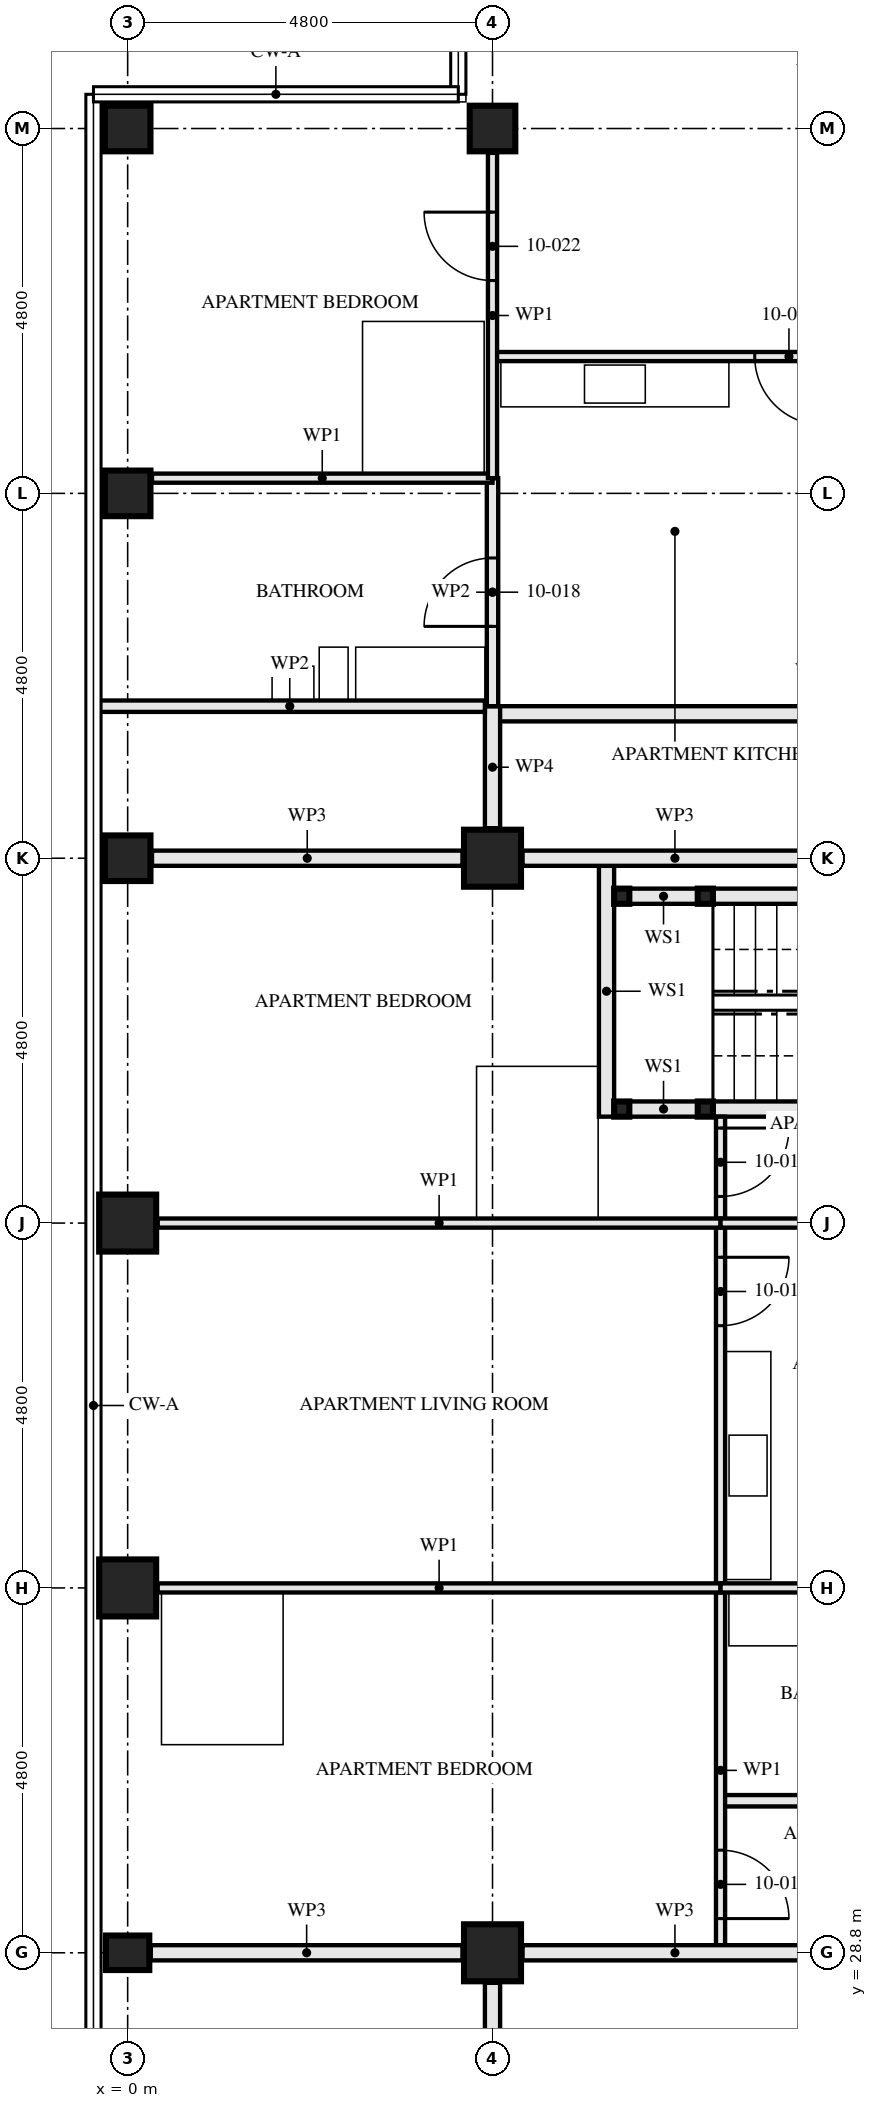
"""IFC4 building model, lengths in metres.
Left out: names, types, materials, properties, quantities, classifications, styles, units other than length and angle.
Written with IfcOpenShell. Run it as: python <this file> out.ifc"""

import sys

from ifc_helpers import new_model, si_unit, direction, frame, frame_2d, origin, origin_2d, place, context, subcontext, project, spatial, rectangle, hollow_rectangle, i_section, extrude, element, fill, save


model = new_model("IFC4")
c1 = context("Model", 3, precision=1e-05, world=origin(), true_north=direction((0.0, 1.0)))
c2 = subcontext(c1, "Body", "Model", "MODEL_VIEW")
j1 = project(units=[si_unit("LENGTHUNIT", "METRE"), si_unit("PLANEANGLEUNIT", "RADIAN")], contexts=[c1])
p1 = place(None, origin())
s1 = spatial("IfcSite", under=j1, at=p1, CompositionType="ELEMENT")
p2 = place(p1, origin())
s2 = spatial("IfcBuilding", under=s1, at=p2, CompositionType="ELEMENT")
p3 = place(p2, frame((0.0, 0.0, 41.0)))
s3 = spatial("IfcBuildingStorey", under=s2, at=p3, CompositionType="ELEMENT", Elevation=41.0)
p4 = place(p3, frame((0.0, 28.8, 0.0), z_axis=(0.0, 0.0, 1.0), x_axis=(0.0, 1.0, 0.0)))
e1 = element("IfcColumn", 1, at=p4, inside=s3, PredefinedType="COLUMN", context=c2, shape_type="SweptSolid", body=[
    extrude(i_section(OverallWidth=0.454, OverallDepth=0.569, WebThickness=0.078, FlangeThickness=0.125, FilletRadius=0.015, at=origin_2d()), origin(), (0.0, 0.0, 1.0), 3.5),
])
for number, where, z_axis, x_axis in (
    (2, (0.0, 33.6, 0.0), (0.0, 0.0, 1.0), (1.0, 0.0, 0.0)),
    (3, (0.0, 38.4, 0.0), (0.0, 0.0, 1.0), (1.0, 0.0, 0.0)),
):
    element("IfcColumn", number, at=place(p3, frame(where, z_axis=z_axis, x_axis=x_axis)), inside=s3, PredefinedType="COLUMN", context=c2, shape_type="SweptSolid", body=[
        extrude(hollow_rectangle(XDim=0.75, YDim=0.75, WallThickness=0.08, at=origin_2d()), origin(), (0.0, 0.0, 1.0), 3.5),
    ])
for number, where, z_axis, x_axis in (
    (4, (0.0, 43.2, 0.0), (0.0, 0.0, 1.0), (0.0, 1.0, 0.0)),
    (5, (0.0, 48.0, 0.0), (0.0, 0.0, 1.0), (1.0, 0.0, 0.0)),
):
    element("IfcColumn", number, at=place(p3, frame(where, z_axis=z_axis, x_axis=x_axis)), inside=s3, PredefinedType="COLUMN", context=c2, shape_type="SweptSolid", body=[
        extrude(hollow_rectangle(XDim=0.6, YDim=0.6, WallThickness=0.08, at=origin_2d()), origin(), (0.0, 0.0, 1.0), 3.5),
    ])
p5 = place(p3, frame((0.0, 52.8, 0.0), z_axis=(0.0, 0.0, 1.0), x_axis=(0.0, 1.0, 0.0)))
e6 = element("IfcColumn", 6, at=p5, inside=s3, PredefinedType="COLUMN", context=c2, shape_type="SweptSolid", body=[
    extrude(hollow_rectangle(XDim=0.6, YDim=0.6, WallThickness=0.06, at=origin_2d()), origin(), (0.0, 0.0, 1.0), 3.5),
])
for number, where, z_axis, x_axis in (
    (7, (4.8, 28.8, 0.0), (0.0, 0.0, 1.0), (0.0, 1.0, 0.0)),
    (8, (4.8, 43.2, 0.0), (0.0, 0.0, 1.0), (0.0, 1.0, 0.0)),
):
    element("IfcColumn", number, at=place(p3, frame(where, z_axis=z_axis, x_axis=x_axis)), inside=s3, PredefinedType="COLUMN", context=c2, shape_type="SweptSolid", body=[
        extrude(hollow_rectangle(XDim=0.75, YDim=0.75, WallThickness=0.08, at=origin_2d()), origin(), (0.0, 0.0, 1.0), 3.5),
    ])
p6 = place(p3, frame((4.8, 52.8, 0.0), z_axis=(0.0, 0.0, 1.0), x_axis=(0.0, 1.0, 0.0)))
e9 = element("IfcColumn", 9, at=p6, inside=s3, PredefinedType="COLUMN", context=c2, shape_type="SweptSolid", body=[
    extrude(hollow_rectangle(XDim=0.6, YDim=0.6, WallThickness=0.06, at=origin_2d()), origin(), (0.0, 0.0, 1.0), 3.5),
])
for number, where, z_axis, x_axis in (
    (10, (6.5, 42.7, 0.0), (0.0, 0.0, 1.0), (1.0, 0.0, 0.0)),
    (11, (6.5, 39.9, 0.0), (0.0, 0.0, 1.0), (1.0, 0.0, 0.0)),
    (12, (7.6, 42.7, 0.0), (0.0, 0.0, 1.0), (1.0, 0.0, 0.0)),
    (13, (7.6, 39.9, 0.0), (0.0, 0.0, 1.0), (1.0, 0.0, 0.0)),
):
    element("IfcColumn", number, at=place(p3, frame(where, z_axis=z_axis, x_axis=x_axis)), inside=s3, PredefinedType="COLUMN", context=c2, shape_type="SweptSolid", body=[
        extrude(hollow_rectangle(XDim=0.2, YDim=0.2, WallThickness=0.008, at=origin_2d()), origin(), (0.0, 0.0, 1.0), 3.33),
    ])
p7 = place(p3, frame((4.8, 26.8, 0.0), z_axis=(0.0, 0.0, 1.0), x_axis=(0.0, 1.0, 0.0)))
e14 = element("IfcWall", 14, at=p7, inside=s3, PredefinedType="PARTITIONING", context=c2, shape_type="SweptSolid", body=[
    extrude(rectangle(XDim=1.605, YDim=0.2, at=frame_2d((0.802, 0.0))), origin(), (0.0, 0.0, 1.0), 3.33),
])
p8 = place(p3, frame((6.6, 42.7, 0.0), z_axis=(0.0, 0.0, 1.0), x_axis=(1.0, 0.0, 0.0)))
e15 = element("IfcWall", 15, at=p8, inside=s3, PredefinedType="SOLIDWALL", context=c2, shape_type="SweptSolid", body=[
    extrude(rectangle(XDim=0.9, YDim=0.2, at=frame_2d((0.45, 0.0))), origin(), (0.0, 0.0, 1.0), 2.99),
])
p9 = place(p3, frame((7.7, 42.7, 0.0), z_axis=(0.0, 0.0, 1.0), x_axis=(1.0, 0.0, 0.0)))
e16 = element("IfcWall", 16, at=p9, inside=s3, PredefinedType="SOLIDWALL", context=c2, shape_type="SweptSolid", body=[
    extrude(rectangle(XDim=4.7, YDim=0.2, at=frame_2d((2.35, 0.0))), origin(), (0.0, 0.0, 1.0), 2.99),
])
p10 = place(p3, frame((6.6, 39.9, 0.0), z_axis=(0.0, 0.0, 1.0), x_axis=(1.0, 0.0, 0.0)))
e17 = element("IfcWall", 17, at=p10, inside=s3, PredefinedType="SOLIDWALL", context=c2, shape_type="SweptSolid", body=[
    extrude(rectangle(XDim=0.9, YDim=0.2, at=frame_2d((0.45, 0.0))), origin(), (0.0, 0.0, 1.0), 2.99),
])
p11 = place(p3, frame((7.7, 39.9, 0.0), z_axis=(0.0, 0.0, 1.0), x_axis=(1.0, 0.0, 0.0)))
e18 = element("IfcWall", 18, at=p11, inside=s3, PredefinedType="SOLIDWALL", context=c2, shape_type="SweptSolid", body=[
    extrude(rectangle(XDim=4.7, YDim=0.2, at=frame_2d((2.35, 0.0))), origin(), (0.0, 0.0, 1.0), 2.99),
])
p12 = place(p3, frame((6.3, 43.1, 0.0), z_axis=(0.0, 0.0, 1.0), x_axis=(0.0, -1.0, 0.0)))
e19 = element("IfcWall", 19, at=p12, inside=s3, PredefinedType="SOLIDWALL", context=c2, shape_type="SweptSolid", body=[
    extrude(rectangle(XDim=3.3, YDim=0.2, at=frame_2d((1.65, 0.0))), origin(), (0.0, 0.0, 1.0), 3.33),
])
p13 = place(p3, frame((7.8, 30.8, 0.0), z_axis=(0.0, 0.0, 1.0), x_axis=(1.0, 0.0, 0.0)))
e20 = element("IfcWall", 20, at=p13, inside=s3, PredefinedType="PARTITIONING", context=c2, shape_type="SweptSolid", body=[
    extrude(rectangle(XDim=3.0, YDim=0.15, at=frame_2d((1.5, 0.0))), origin(), (0.0, 0.0, 1.0), 3.33),
])
p14 = place(p13, frame((1.05, 0.0, 0.0)))
e21 = element("IfcOpeningElement", 21, at=p14, cuts=e20, PredefinedType="OPENING", context=c2, shape_type="SweptSolid", body=[
    extrude(rectangle(XDim=0.9, YDim=2.1, at=frame_2d((0.45, 1.05))), frame((0.0, 0.085, 0.0), z_axis=(0.0, -1.0, 0.0), x_axis=(1.0, 0.0, 0.0)), (0.0, 0.0, 1.0), 0.171),
])
p15 = place(p3, frame((7.8, 38.4, 0.0), z_axis=(0.0, 0.0, 1.0), x_axis=(1.0, 0.0, 0.0)))
e22 = element("IfcWall", 22, at=p15, inside=s3, PredefinedType="PARTITIONING", context=c2, shape_type="SweptSolid", body=[
    extrude(rectangle(XDim=4.65, YDim=0.12, at=frame_2d((2.325, 0.0))), origin(), (0.0, 0.0, 1.0), 2.55),
])
p16 = place(p15, frame((1.875, 0.0, 0.0)))
e23 = element("IfcOpeningElement", 23, at=p16, cuts=e22, PredefinedType="OPENING", context=c2, shape_type="SweptSolid", body=[
    extrude(rectangle(XDim=0.9, YDim=2.1, at=frame_2d((0.45, 1.05))), frame((0.0, 0.071, 0.0), z_axis=(0.0, -1.0, 0.0), x_axis=(1.0, 0.0, 0.0)), (0.0, 0.0, 1.0), 0.141),
])
p17 = place(p3, frame((7.8, 33.6, 0.0), z_axis=(0.0, 0.0, 1.0), x_axis=(1.0, 0.0, 0.0)))
e24 = element("IfcWall", 24, at=p17, inside=s3, PredefinedType="PARTITIONING", context=c2, shape_type="SweptSolid", body=[
    extrude(rectangle(XDim=4.65, YDim=0.12, at=frame_2d((2.325, 0.0))), origin(), (0.0, 0.0, 1.0), 2.55),
])
p18 = place(p17, frame((3.35, 0.0, 0.0)))
e25 = element("IfcOpeningElement", 25, at=p18, cuts=e24, PredefinedType="OPENING", context=c2, shape_type="SweptSolid", body=[
    extrude(rectangle(XDim=0.9, YDim=2.1, at=frame_2d((0.45, 1.05))), frame((0.0, 0.071, 0.0), z_axis=(0.0, -1.0, 0.0), x_axis=(1.0, 0.0, 0.0)), (0.0, 0.0, 1.0), 0.141),
])
p19 = place(p3, frame((7.8, 39.8, 0.0), z_axis=(0.0, 0.0, 1.0), x_axis=(0.0, -1.0, 0.0)))
e26 = element("IfcWall", 26, at=p19, inside=s3, PredefinedType="PARTITIONING", context=c2, shape_type="SweptSolid", body=[
    extrude(rectangle(XDim=1.4, YDim=0.12, at=frame_2d((0.7, 0.0))), origin(), (0.0, 0.0, 1.0), 3.33),
])
p20 = place(p19, frame((0.15, 0.0, 0.0)))
e27 = element("IfcOpeningElement", 27, at=p20, cuts=e26, PredefinedType="OPENING", context=c2, shape_type="SweptSolid", body=[
    extrude(rectangle(XDim=0.9, YDim=2.1, at=frame_2d((0.45, 1.05))), frame((0.0, 0.071, 0.0), z_axis=(0.0, -1.0, 0.0), x_axis=(1.0, 0.0, 0.0)), (0.0, 0.0, 1.0), 0.141),
])
p21 = place(p3, frame((7.8, 38.4, 0.0), z_axis=(0.0, 0.0, 1.0), x_axis=(0.0, -1.0, 0.0)))
e28 = element("IfcWall", 28, at=p21, inside=s3, PredefinedType="PARTITIONING", context=c2, shape_type="SweptSolid", body=[
    extrude(rectangle(XDim=4.8, YDim=0.12, at=frame_2d((2.4, 0.0))), origin(), (0.0, 0.0, 1.0), 3.33),
])
p22 = place(p21, frame((0.45, 0.0, 0.0)))
e29 = element("IfcOpeningElement", 29, at=p22, cuts=e28, PredefinedType="OPENING", context=c2, shape_type="SweptSolid", body=[
    extrude(rectangle(XDim=0.9, YDim=2.1, at=frame_2d((0.45, 1.05))), frame((0.0, 0.071, 0.0), z_axis=(0.0, -1.0, 0.0), x_axis=(1.0, 0.0, 0.0)), (0.0, 0.0, 1.0), 0.141),
])
p23 = place(p3, frame((7.8, 33.6, 0.0), z_axis=(0.0, 0.0, 1.0), x_axis=(0.0, -1.0, 0.0)))
e30 = element("IfcWall", 30, at=p23, inside=s3, PredefinedType="PARTITIONING", context=c2, shape_type="SweptSolid", body=[
    extrude(rectangle(XDim=4.8, YDim=0.12, at=frame_2d((2.4, 0.0))), origin(), (0.0, 0.0, 1.0), 3.33),
])
p24 = place(p23, frame((3.45, 0.0, 0.0)))
e31 = element("IfcOpeningElement", 31, at=p24, cuts=e30, PredefinedType="OPENING", context=c2, shape_type="SweptSolid", body=[
    extrude(rectangle(XDim=0.9, YDim=2.1, at=frame_2d((0.45, 1.05))), frame((0.0, 0.071, 0.0), z_axis=(0.0, -1.0, 0.0), x_axis=(1.0, 0.0, 0.0)), (0.0, 0.0, 1.0), 0.141),
])
for number, where, z_axis, x_axis in (
    (32, (0.395, 38.4, 0.0), (0.0, 0.0, 1.0), (1.0, 0.0, 0.0)),
    (33, (0.395, 33.6, 0.0), (0.0, 0.0, 1.0), (1.0, 0.0, 0.0)),
):
    element("IfcWall", number, at=place(p3, frame(where, z_axis=z_axis, x_axis=x_axis)), inside=s3, PredefinedType="PARTITIONING", context=c2, shape_type="SweptSolid", body=[
        extrude(rectangle(XDim=7.405, YDim=0.12, at=frame_2d((3.703, 0.0))), origin(), (0.0, 0.0, 1.0), 2.55),
    ])
p25 = place(p3, frame((4.8, 48.2, 0.0), z_axis=(0.0, 0.0, 1.0), x_axis=(0.0, -1.0, 0.0)))
e34 = element("IfcWall", 34, at=p25, inside=s3, PredefinedType="PARTITIONING", context=c2, shape_type="SweptSolid", body=[
    extrude(rectangle(XDim=3.0, YDim=0.15, at=frame_2d((1.5, 0.0))), origin(), (0.0, 0.0, 1.0), 2.55),
])
p26 = place(p25, frame((1.05, 0.0, 0.0)))
e35 = element("IfcOpeningElement", 35, at=p26, cuts=e34, PredefinedType="OPENING", context=c2, shape_type="SweptSolid", body=[
    extrude(rectangle(XDim=0.9, YDim=2.1, at=frame_2d((0.45, 1.05))), frame((0.0, 0.085, 0.0), z_axis=(0.0, -1.0, 0.0), x_axis=(1.0, 0.0, 0.0)), (0.0, 0.0, 1.0), 0.171),
])
p27 = place(p3, frame((9.6, 49.8, 0.0), z_axis=(0.0, 0.0, 1.0), x_axis=(-1.0, 0.0, 0.0)))
e36 = element("IfcWall", 36, at=p27, inside=s3, PredefinedType="PARTITIONING", context=c2, shape_type="SweptSolid", body=[
    extrude(rectangle(XDim=4.8, YDim=0.12, at=frame_2d((2.4, 0.0))), origin(), (0.0, 0.0, 1.0), 3.33),
])
p28 = place(p27, frame((0.45, 0.0, 0.0)))
e37 = element("IfcOpeningElement", 37, at=p28, cuts=e36, PredefinedType="OPENING", context=c2, shape_type="SweptSolid", body=[
    extrude(rectangle(XDim=0.9, YDim=2.1, at=frame_2d((0.45, 1.05))), frame((0.0, 0.071, 0.0), z_axis=(0.0, -1.0, 0.0), x_axis=(1.0, 0.0, 0.0)), (0.0, 0.0, 1.0), 0.141),
])
p29 = place(p3, frame((4.8, 48.2, 0.0), z_axis=(0.0, 0.0, 1.0), x_axis=(-1.0, 0.0, 0.0)))
e38 = element("IfcWall", 38, at=p29, inside=s3, PredefinedType="PARTITIONING", context=c2, shape_type="SweptSolid", body=[
    extrude(rectangle(XDim=4.48, YDim=0.12, at=frame_2d((2.24, 0.0))), origin(), (0.0, 0.0, 1.0), 3.33),
])
p30 = place(p3, frame((4.8, 52.48, 0.0), z_axis=(0.0, 0.0, 1.0), x_axis=(0.0, -1.0, 0.0)))
e39 = element("IfcWall", 39, at=p30, inside=s3, PredefinedType="PARTITIONING", context=c2, shape_type="SweptSolid", body=[
    extrude(rectangle(XDim=4.28, YDim=0.12, at=frame_2d((2.14, 0.0))), origin(), (0.0, 0.0, 1.0), 3.33),
])
p31 = place(p30, frame((0.78, 0.0, 0.0)))
e40 = element("IfcOpeningElement", 40, at=p31, cuts=e39, PredefinedType="OPENING", context=c2, shape_type="SweptSolid", body=[
    extrude(rectangle(XDim=0.9, YDim=2.1, at=frame_2d((0.45, 1.05))), frame((0.0, 0.071, 0.0), z_axis=(0.0, -1.0, 0.0), x_axis=(1.0, 0.0, 0.0)), (0.0, 0.0, 1.0), 0.141),
])
p32 = place(p3, frame((14.4, 45.1, 0.0), z_axis=(0.0, 0.0, 1.0), x_axis=(-1.0, 0.0, 0.0)))
e41 = element("IfcWall", 41, at=p32, inside=s3, PredefinedType="PARTITIONING", context=c2, shape_type="SweptSolid", body=[
    extrude(rectangle(XDim=9.6, YDim=0.2, at=frame_2d((4.8, 0.0))), origin(), (0.0, 0.0, 1.0), 3.33),
])
p33 = place(p32, frame((0.4, 0.0, 0.0)))
e42 = element("IfcOpeningElement", 42, at=p33, cuts=e41, PredefinedType="OPENING", context=c2, shape_type="SweptSolid", body=[
    extrude(rectangle(XDim=1.0, YDim=2.1, at=frame_2d((0.5, 1.05))), frame((0.0, 0.111, 0.0), z_axis=(0.0, -1.0, 0.0), x_axis=(1.0, 0.0, 0.0)), (0.0, 0.0, 1.0), 0.221),
])
p34 = place(p3, frame((4.8, 45.2, 0.0), z_axis=(0.0, 0.0, 1.0), x_axis=(0.0, -1.0, 0.0)))
e43 = element("IfcWall", 43, at=p34, inside=s3, PredefinedType="PARTITIONING", context=c2, shape_type="SweptSolid", body=[
    extrude(rectangle(XDim=1.605, YDim=0.2, at=frame_2d((0.802, 0.0))), origin(), (0.0, 0.0, 1.0), 3.33),
])
p35 = place(p3, frame((9.205, 28.8, 0.0), z_axis=(0.0, 0.0, 1.0), x_axis=(-1.0, 0.0, 0.0)))
e44 = element("IfcWall", 44, at=p35, inside=s3, PredefinedType="PARTITIONING", context=c2, shape_type="SweptSolid", body=[
    extrude(rectangle(XDim=4.01, YDim=0.2, at=frame_2d((2.005, 0.0))), origin(), (0.0, 0.0, 1.0), 2.32),
])
p36 = place(p3, frame((4.405, 28.8, 0.0), z_axis=(0.0, 0.0, 1.0), x_axis=(-1.0, 0.0, 0.0)))
e45 = element("IfcWall", 45, at=p36, inside=s3, PredefinedType="PARTITIONING", context=c2, shape_type="SweptSolid", body=[
    extrude(rectangle(XDim=4.101, YDim=0.2, at=frame_2d((2.05, 0.0))), origin(), (0.0, 0.0, 1.0), 2.32),
])
p37 = place(p3, frame((9.205, 43.2, 0.0), z_axis=(0.0, 0.0, 1.0), x_axis=(-1.0, 0.0, 0.0)))
e46 = element("IfcWall", 46, at=p37, inside=s3, PredefinedType="PARTITIONING", context=c2, shape_type="SweptSolid", body=[
    extrude(rectangle(XDim=4.01, YDim=0.2, at=frame_2d((2.005, 0.0))), origin(), (0.0, 0.0, 1.0), 2.32),
])
p38 = place(p3, frame((4.405, 43.2, 0.0), z_axis=(0.0, 0.0, 1.0), x_axis=(-1.0, 0.0, 0.0)))
e47 = element("IfcWall", 47, at=p38, inside=s3, PredefinedType="PARTITIONING", context=c2, shape_type="SweptSolid", body=[
    extrude(rectangle(XDim=4.085, YDim=0.2, at=frame_2d((2.042, 0.0))), origin(), (0.0, 0.0, 1.0), 2.32),
])
p39 = place(p3, frame((4.7, 45.2, 0.0), z_axis=(0.0, 0.0, 1.0), x_axis=(-1.0, 0.0, 0.0)))
e48 = element("IfcWall", 48, at=p39, inside=s3, PredefinedType="PARTITIONING", context=c2, shape_type="SweptSolid", body=[
    extrude(rectangle(XDim=5.135, YDim=0.15, at=frame_2d((2.567, 0.0))), origin(), (0.0, 0.0, 1.0), 2.32),
])
p40 = place(p20, origin())
e49 = element("IfcDoor", 49, at=p40, inside=s3, OperationType="SINGLE_SWING_RIGHT", PredefinedType="DOOR", context=c2, shape_type="SweptSolid", body=[
    extrude(rectangle(XDim=0.9, YDim=2.1, at=frame_2d((0.45, 1.05))), frame((0.0, 0.022, 0.0), z_axis=(0.0, -1.0, 0.0), x_axis=(1.0, 0.0, 0.0)), (0.0, 0.0, 1.0), 0.044),
])
fill(e27, e49)
p41 = place(p22, origin())
e50 = element("IfcDoor", 50, at=p41, inside=s3, OperationType="SINGLE_SWING_RIGHT", PredefinedType="DOOR", context=c2, shape_type="SweptSolid", body=[
    extrude(rectangle(XDim=0.9, YDim=2.1, at=frame_2d((0.45, 1.05))), frame((0.0, 0.022, 0.0), z_axis=(0.0, -1.0, 0.0), x_axis=(1.0, 0.0, 0.0)), (0.0, 0.0, 1.0), 0.044),
])
fill(e29, e50)
p42 = place(p24, origin())
e51 = element("IfcDoor", 51, at=p42, inside=s3, OperationType="SINGLE_SWING_LEFT", PredefinedType="DOOR", context=c2, shape_type="SweptSolid", body=[
    extrude(rectangle(XDim=0.9, YDim=2.1, at=frame_2d((0.45, 1.05))), frame((0.0, 0.022, 0.0), z_axis=(0.0, -1.0, 0.0), x_axis=(1.0, 0.0, 0.0)), (0.0, 0.0, 1.0), 0.044),
])
fill(e31, e51)
p43 = place(p26, frame((0.9, 0.0, 0.0), z_axis=(0.0, 0.0, 1.0), x_axis=(-1.0, 0.0, 0.0)))
e52 = element("IfcDoor", 52, at=p43, inside=s3, OperationType="SINGLE_SWING_RIGHT", PredefinedType="DOOR", context=c2, shape_type="SweptSolid", body=[
    extrude(rectangle(XDim=0.9, YDim=2.1, at=frame_2d((0.45, 1.05))), frame((0.0, 0.022, 0.0), z_axis=(0.0, -1.0, 0.0), x_axis=(1.0, 0.0, 0.0)), (0.0, 0.0, 1.0), 0.044),
])
fill(e35, e52)
p44 = place(p28, origin())
e53 = element("IfcDoor", 53, at=p44, inside=s3, OperationType="SINGLE_SWING_RIGHT", PredefinedType="DOOR", context=c2, shape_type="SweptSolid", body=[
    extrude(rectangle(XDim=0.9, YDim=2.1, at=frame_2d((0.45, 1.05))), frame((0.0, 0.022, 0.0), z_axis=(0.0, -1.0, 0.0), x_axis=(1.0, 0.0, 0.0)), (0.0, 0.0, 1.0), 0.044),
])
fill(e37, e53)
p45 = place(p31, frame((0.9, 0.0, 0.0), z_axis=(0.0, 0.0, 1.0), x_axis=(-1.0, 0.0, 0.0)))
e54 = element("IfcDoor", 54, at=p45, inside=s3, OperationType="SINGLE_SWING_LEFT", PredefinedType="DOOR", context=c2, shape_type="SweptSolid", body=[
    extrude(rectangle(XDim=0.9, YDim=2.1, at=frame_2d((0.45, 1.05))), frame((0.0, 0.022, 0.0), z_axis=(0.0, -1.0, 0.0), x_axis=(1.0, 0.0, 0.0)), (0.0, 0.0, 1.0), 0.044),
])
fill(e40, e54)
save(model, sys.argv[1])
